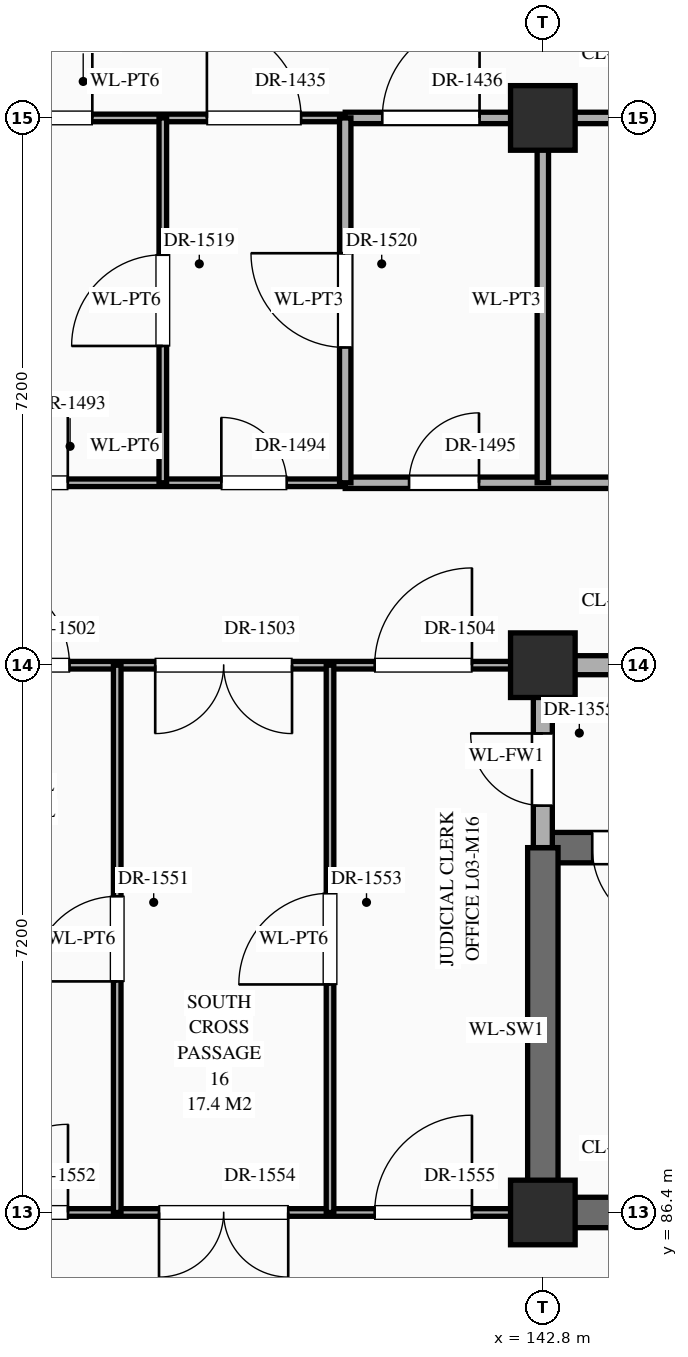
"""IFC4 building model, lengths in metres.
Left out: names, types, materials, properties, quantities, classifications, styles, units other than length and angle.
Written with IfcOpenShell. Run it as: python <this file> out.ifc"""

import sys

from ifc_helpers import new_model, si_unit, direction, frame, frame_2d, origin, origin_2d, place, context, subcontext, project, spatial, rectangle, extrude, element, fill, save


model = new_model("IFC4")
c1 = context("Model", 3, precision=1e-05, world=origin(), true_north=direction((0.0, 1.0)))
c2 = subcontext(c1, "Body", "Model", "MODEL_VIEW")
j1 = project(units=[si_unit("LENGTHUNIT", "METRE"), si_unit("PLANEANGLEUNIT", "RADIAN")], contexts=[c1])
p1 = place(None, origin())
s1 = spatial("IfcSite", under=j1, at=p1, CompositionType="ELEMENT")
p2 = place(p1, origin())
s2 = spatial("IfcBuilding", under=s1, at=p2, CompositionType="ELEMENT")
p3 = place(p2, frame((0.0, 0.0, 10.8)))
s3 = spatial("IfcBuildingStorey", under=s2, at=p3, CompositionType="ELEMENT", Elevation=10.8)
for number, where, z_axis, x_axis in (
    (1, (142.8, 86.4, 0.0), (0.0, 0.0, 1.0), (1.0, 0.0, 0.0)),
    (2, (142.8, 93.6, 0.0), (0.0, 0.0, 1.0), (1.0, 0.0, 0.0)),
    (3, (142.8, 100.8, 0.0), (0.0, 0.0, 1.0), (1.0, 0.0, 0.0)),
):
    element("IfcColumn", number, at=place(p3, frame(where, z_axis=z_axis, x_axis=x_axis)), inside=s3, PredefinedType="COLUMN", context=c2, shape_type="SweptSolid", body=[
        extrude(rectangle(XDim=0.85, YDim=0.85, at=origin_2d()), origin(), (0.0, 0.0, 1.0), 5.4),
    ])
p4 = place(p3, frame((126.0, 86.4, 0.0), z_axis=(0.0, 0.0, 1.0), x_axis=(1.0, 0.0, 0.0)))
e4 = element("IfcWall", 4, at=p4, inside=s3, PredefinedType="STANDARD", context=c2, shape_type="SweptSolid", body=[
    extrude(rectangle(XDim=16.8, YDim=0.1, at=frame_2d((8.4, 0.0))), origin(), (0.0, 0.0, 1.0), 4.27),
])
p5 = place(p4, frame((3.66, 0.0, 0.0)))
e5 = element("IfcOpeningElement", 5, at=p5, cuts=e4, PredefinedType="OPENING", context=c2, shape_type="SweptSolid", body=[
    extrude(rectangle(XDim=1.08, YDim=2.25, at=frame_2d((0.54, 1.125))), frame((0.0, 0.062, 0.0), z_axis=(0.0, -1.0, 0.0), x_axis=(1.0, 0.0, 0.0)), (0.0, 0.0, 1.0), 0.124),
])
p6 = place(p4, frame((9.393, 0.0, 0.0)))
e6 = element("IfcOpeningElement", 6, at=p6, cuts=e4, PredefinedType="OPENING", context=c2, shape_type="SweptSolid", body=[
    extrude(rectangle(XDim=1.16, YDim=2.3, at=frame_2d((0.58, 1.15))), frame((0.0, 0.062, 0.0), z_axis=(0.0, -1.0, 0.0), x_axis=(1.0, 0.0, 0.0)), (0.0, 0.0, 1.0), 0.124),
])
p7 = place(p4, frame((11.75, 0.0, 0.0)))
e7 = element("IfcOpeningElement", 7, at=p7, cuts=e4, PredefinedType="OPENING", context=c2, shape_type="SweptSolid", body=[
    extrude(rectangle(XDim=1.7, YDim=2.45, at=frame_2d((0.85, 1.225))), frame((0.0, 0.062, 0.0), z_axis=(0.0, -1.0, 0.0), x_axis=(1.0, 0.0, 0.0)), (0.0, 0.0, 1.0), 0.124),
])
p8 = place(p4, frame((14.587, 0.0, 0.0)))
e8 = element("IfcOpeningElement", 8, at=p8, cuts=e4, PredefinedType="OPENING", context=c2, shape_type="SweptSolid", body=[
    extrude(rectangle(XDim=1.28, YDim=2.35, at=frame_2d((0.64, 1.175))), frame((0.0, 0.062, 0.0), z_axis=(0.0, -1.0, 0.0), x_axis=(1.0, 0.0, 0.0)), (0.0, 0.0, 1.0), 0.124),
])
p9 = place(p3, frame((142.8, 86.4, 0.0), z_axis=(0.0, 0.0, 1.0), x_axis=(1.0, 0.0, 0.0)))
e9 = element("IfcWall", 9, at=p9, inside=s3, PredefinedType="SHEAR", context=c2, shape_type="SweptSolid", body=[
    extrude(rectangle(XDim=8.4, YDim=0.4, at=frame_2d((4.2, 0.0))), origin(), (0.0, 0.0, 1.0), 5.12),
])
p10 = place(p3, frame((142.8, 91.2, 0.0), z_axis=(0.0, 0.0, 1.0), x_axis=(1.0, 0.0, 0.0)))
e10 = element("IfcWall", 10, at=p10, inside=s3, PredefinedType="SHEAR", context=c2, shape_type="SweptSolid", body=[
    extrude(rectangle(XDim=8.4, YDim=0.4, at=frame_2d((4.2, 0.0))), origin(), (0.0, 0.0, 1.0), 5.12),
])
p11 = place(p10, frame((0.65, 0.0, 0.0)))
e11 = element("IfcOpeningElement", 11, at=p11, cuts=e10, PredefinedType="OPENING", context=c2, shape_type="SweptSolid", body=[
    extrude(rectangle(XDim=1.1, YDim=2.2, at=frame_2d((0.55, 1.1))), frame((0.0, 0.212, 0.0), z_axis=(0.0, -1.0, 0.0), x_axis=(1.0, 0.0, 0.0)), (0.0, 0.0, 1.0), 0.424),
])
p12 = place(p3, frame((126.0, 93.6, 0.0), z_axis=(0.0, 0.0, 1.0), x_axis=(1.0, 0.0, 0.0)))
e12 = element("IfcWall", 12, at=p12, inside=s3, PredefinedType="STANDARD", context=c2, shape_type="SweptSolid", body=[
    extrude(rectangle(XDim=16.8, YDim=0.1, at=frame_2d((8.4, 0.0))), origin(), (0.0, 0.0, 1.0), 4.27),
])
p13 = place(p12, frame((3.62, 0.0, 0.0)))
e13 = element("IfcOpeningElement", 13, at=p13, cuts=e12, PredefinedType="OPENING", context=c2, shape_type="SweptSolid", body=[
    extrude(rectangle(XDim=1.16, YDim=2.3, at=frame_2d((0.58, 1.15))), frame((0.0, 0.062, 0.0), z_axis=(0.0, -1.0, 0.0), x_axis=(1.0, 0.0, 0.0)), (0.0, 0.0, 1.0), 0.124),
])
p14 = place(p12, frame((9.373, 0.0, 0.0)))
e14 = element("IfcOpeningElement", 14, at=p14, cuts=e12, PredefinedType="OPENING", context=c2, shape_type="SweptSolid", body=[
    extrude(rectangle(XDim=1.2, YDim=2.35, at=frame_2d((0.6, 1.175))), frame((0.0, 0.062, 0.0), z_axis=(0.0, -1.0, 0.0), x_axis=(1.0, 0.0, 0.0)), (0.0, 0.0, 1.0), 0.124),
])
p15 = place(p12, frame((11.7, 0.0, 0.0)))
e15 = element("IfcOpeningElement", 15, at=p15, cuts=e12, PredefinedType="OPENING", context=c2, shape_type="SweptSolid", body=[
    extrude(rectangle(XDim=1.8, YDim=2.5, at=frame_2d((0.9, 1.25))), frame((0.0, 0.062, 0.0), z_axis=(0.0, -1.0, 0.0), x_axis=(1.0, 0.0, 0.0)), (0.0, 0.0, 1.0), 0.124),
])
p16 = place(p12, frame((14.587, 0.0, 0.0)))
e16 = element("IfcOpeningElement", 16, at=p16, cuts=e12, PredefinedType="OPENING", context=c2, shape_type="SweptSolid", body=[
    extrude(rectangle(XDim=1.28, YDim=2.35, at=frame_2d((0.64, 1.175))), frame((0.0, 0.062, 0.0), z_axis=(0.0, -1.0, 0.0), x_axis=(1.0, 0.0, 0.0)), (0.0, 0.0, 1.0), 0.124),
])
p17 = place(p3, frame((142.8, 93.6, 0.0), z_axis=(0.0, 0.0, 1.0), x_axis=(1.0, 0.0, 0.0)))
e17 = element("IfcWall", 17, at=p17, inside=s3, PredefinedType="STANDARD", context=c2, shape_type="SweptSolid", body=[
    extrude(rectangle(XDim=8.4, YDim=0.25, at=frame_2d((4.2, 0.0))), origin(), (0.0, 0.0, 1.0), 4.27),
])
p18 = place(p17, frame((3.3, 0.0, 0.0)))
e18 = element("IfcOpeningElement", 18, at=p18, cuts=e17, PredefinedType="OPENING", context=c2, shape_type="SweptSolid", body=[
    extrude(rectangle(XDim=1.8, YDim=2.35, at=frame_2d((0.9, 1.175))), frame((0.0, 0.137, 0.0), z_axis=(0.0, -1.0, 0.0), x_axis=(1.0, 0.0, 0.0)), (0.0, 0.0, 1.0), 0.274),
])
p19 = place(p3, frame((134.4, 96.0, 0.0), z_axis=(0.0, 0.0, 1.0), x_axis=(1.0, 0.0, 0.0)))
e19 = element("IfcWall", 19, at=p19, inside=s3, PredefinedType="STANDARD", context=c2, shape_type="SweptSolid", body=[
    extrude(rectangle(XDim=5.8, YDim=0.1, at=frame_2d((2.9, 0.0))), origin(), (0.0, 0.0, 1.0), 5.12),
])
p20 = place(p19, frame((1.25, 0.0, 0.0)))
e20 = element("IfcOpeningElement", 20, at=p20, cuts=e19, PredefinedType="OPENING", context=c2, shape_type="SweptSolid", body=[
    extrude(rectangle(XDim=0.9, YDim=2.15, at=frame_2d((0.45, 1.075))), frame((0.0, 0.062, 0.0), z_axis=(0.0, -1.0, 0.0), x_axis=(1.0, 0.0, 0.0)), (0.0, 0.0, 1.0), 0.124),
])
p21 = place(p19, frame((4.17, 0.0, 0.0)))
e21 = element("IfcOpeningElement", 21, at=p21, cuts=e19, PredefinedType="OPENING", context=c2, shape_type="SweptSolid", body=[
    extrude(rectangle(XDim=0.86, YDim=2.1, at=frame_2d((0.43, 1.05))), frame((0.0, 0.062, 0.0), z_axis=(0.0, -1.0, 0.0), x_axis=(1.0, 0.0, 0.0)), (0.0, 0.0, 1.0), 0.124),
])
p22 = place(p3, frame((140.2, 96.0, 0.0), z_axis=(0.0, 0.0, 1.0), x_axis=(1.0, 0.0, 0.0)))
e22 = element("IfcWall", 22, at=p22, inside=s3, PredefinedType="STANDARD", context=c2, shape_type="SweptSolid", body=[
    extrude(rectangle(XDim=19.4, YDim=0.15, at=frame_2d((9.7, 0.0))), origin(), (0.0, 0.0, 1.0), 5.12),
])
p23 = place(p22, frame((0.84, 0.0, 0.0)))
e23 = element("IfcOpeningElement", 23, at=p23, cuts=e22, PredefinedType="OPENING", context=c2, shape_type="SweptSolid", body=[
    extrude(rectangle(XDim=0.92, YDim=2.15, at=frame_2d((0.46, 1.075))), frame((0.0, 0.087, 0.0), z_axis=(0.0, -1.0, 0.0), x_axis=(1.0, 0.0, 0.0)), (0.0, 0.0, 1.0), 0.174),
])
p24 = place(p22, frame((6.32, 0.0, 0.0)))
e24 = element("IfcOpeningElement", 24, at=p24, cuts=e22, PredefinedType="OPENING", context=c2, shape_type="SweptSolid", body=[
    extrude(rectangle(XDim=0.96, YDim=2.2, at=frame_2d((0.48, 1.1))), frame((0.0, 0.087, 0.0), z_axis=(0.0, -1.0, 0.0), x_axis=(1.0, 0.0, 0.0)), (0.0, 0.0, 1.0), 0.174),
])
p25 = place(p22, frame((14.7, 0.0, 0.0)))
e25 = element("IfcOpeningElement", 25, at=p25, cuts=e22, PredefinedType="OPENING", context=c2, shape_type="SweptSolid", body=[
    extrude(rectangle(XDim=1.0, YDim=2.25, at=frame_2d((0.5, 1.125))), frame((0.0, 0.087, 0.0), z_axis=(0.0, -1.0, 0.0), x_axis=(1.0, 0.0, 0.0)), (0.0, 0.0, 1.0), 0.174),
])
p26 = place(p3, frame((134.4, 100.8, 0.0), z_axis=(0.0, 0.0, 1.0), x_axis=(1.0, 0.0, 0.0)))
e26 = element("IfcWall", 26, at=p26, inside=s3, PredefinedType="STANDARD", context=c2, shape_type="SweptSolid", body=[
    extrude(rectangle(XDim=5.8, YDim=0.1, at=frame_2d((2.9, 0.0))), origin(), (0.0, 0.0, 1.0), 4.27),
])
p27 = place(p26, frame((1.272, 0.0, 0.0)))
e27 = element("IfcOpeningElement", 27, at=p27, cuts=e26, PredefinedType="OPENING", context=c2, shape_type="SweptSolid", body=[
    extrude(rectangle(XDim=1.2, YDim=2.35, at=frame_2d((0.6, 1.175))), frame((0.0, 0.062, 0.0), z_axis=(0.0, -1.0, 0.0), x_axis=(1.0, 0.0, 0.0)), (0.0, 0.0, 1.0), 0.124),
])
p28 = place(p26, frame((3.98, 0.0, 0.0)))
e28 = element("IfcOpeningElement", 28, at=p28, cuts=e26, PredefinedType="OPENING", context=c2, shape_type="SweptSolid", body=[
    extrude(rectangle(XDim=1.24, YDim=2.3, at=frame_2d((0.62, 1.15))), frame((0.0, 0.062, 0.0), z_axis=(0.0, -1.0, 0.0), x_axis=(1.0, 0.0, 0.0)), (0.0, 0.0, 1.0), 0.124),
])
p29 = place(p3, frame((140.2, 100.8, 0.0), z_axis=(0.0, 0.0, 1.0), x_axis=(1.0, 0.0, 0.0)))
e29 = element("IfcWall", 29, at=p29, inside=s3, PredefinedType="STANDARD", context=c2, shape_type="SweptSolid", body=[
    extrude(rectangle(XDim=19.4, YDim=0.15, at=frame_2d((9.7, 0.0))), origin(), (0.0, 0.0, 1.0), 4.27),
])
p30 = place(p29, frame((0.488, 0.0, 0.0)))
e30 = element("IfcOpeningElement", 30, at=p30, cuts=e29, PredefinedType="OPENING", context=c2, shape_type="SweptSolid", body=[
    extrude(rectangle(XDim=1.28, YDim=2.35, at=frame_2d((0.64, 1.175))), frame((0.0, 0.087, 0.0), z_axis=(0.0, -1.0, 0.0), x_axis=(1.0, 0.0, 0.0)), (0.0, 0.0, 1.0), 0.174),
])
p31 = place(p29, frame((6.33, 0.0, 0.0)))
e31 = element("IfcOpeningElement", 31, at=p31, cuts=e29, PredefinedType="OPENING", context=c2, shape_type="SweptSolid", body=[
    extrude(rectangle(XDim=0.94, YDim=2.3, at=frame_2d((0.47, 1.15))), frame((0.0, 0.087, 0.0), z_axis=(0.0, -1.0, 0.0), x_axis=(1.0, 0.0, 0.0)), (0.0, 0.0, 1.0), 0.174),
])
p32 = place(p29, frame((14.71, 0.0, 0.0)))
e32 = element("IfcOpeningElement", 32, at=p32, cuts=e29, PredefinedType="OPENING", context=c2, shape_type="SweptSolid", body=[
    extrude(rectangle(XDim=0.98, YDim=2.35, at=frame_2d((0.49, 1.175))), frame((0.0, 0.087, 0.0), z_axis=(0.0, -1.0, 0.0), x_axis=(1.0, 0.0, 0.0)), (0.0, 0.0, 1.0), 0.174),
])
p33 = place(p3, frame((137.2, 86.4, 0.0), z_axis=(0.0, 0.0, 1.0), x_axis=(0.0, 1.0, 0.0)))
e33 = element("IfcWall", 33, at=p33, inside=s3, PredefinedType="STANDARD", context=c2, shape_type="SweptSolid", body=[
    extrude(rectangle(XDim=7.2, YDim=0.1, at=frame_2d((3.6, 0.0))), origin(), (0.0, 0.0, 1.0), 5.12),
])
p34 = place(p33, frame((3.04, 0.0, 0.0)))
e34 = element("IfcOpeningElement", 34, at=p34, cuts=e33, PredefinedType="OPENING", context=c2, shape_type="SweptSolid", body=[
    extrude(rectangle(XDim=1.12, YDim=2.25, at=frame_2d((0.56, 1.125))), frame((0.0, 0.062, 0.0), z_axis=(0.0, -1.0, 0.0), x_axis=(1.0, 0.0, 0.0)), (0.0, 0.0, 1.0), 0.124),
])
p35 = place(p3, frame((137.8, 96.0, 0.0), z_axis=(0.0, 0.0, 1.0), x_axis=(0.0, 1.0, 0.0)))
e35 = element("IfcWall", 35, at=p35, inside=s3, PredefinedType="STANDARD", context=c2, shape_type="SweptSolid", body=[
    extrude(rectangle(XDim=4.8, YDim=0.1, at=frame_2d((2.4, 0.0))), origin(), (0.0, 0.0, 1.0), 5.12),
])
p36 = place(p35, frame((1.8, 0.0, 0.0)))
e36 = element("IfcOpeningElement", 36, at=p36, cuts=e35, PredefinedType="OPENING", context=c2, shape_type="SweptSolid", body=[
    extrude(rectangle(XDim=1.2, YDim=2.35, at=frame_2d((0.6, 1.175))), frame((0.0, 0.062, 0.0), z_axis=(0.0, -1.0, 0.0), x_axis=(1.0, 0.0, 0.0)), (0.0, 0.0, 1.0), 0.124),
])
p37 = place(p3, frame((140.0, 86.4, 0.0), z_axis=(0.0, 0.0, 1.0), x_axis=(0.0, 1.0, 0.0)))
e37 = element("IfcWall", 37, at=p37, inside=s3, PredefinedType="STANDARD", context=c2, shape_type="SweptSolid", body=[
    extrude(rectangle(XDim=7.2, YDim=0.1, at=frame_2d((3.6, 0.0))), origin(), (0.0, 0.0, 1.0), 5.12),
])
p38 = place(p37, frame((3.0, 0.0, 0.0)))
e38 = element("IfcOpeningElement", 38, at=p38, cuts=e37, PredefinedType="OPENING", context=c2, shape_type="SweptSolid", body=[
    extrude(rectangle(XDim=1.2, YDim=2.35, at=frame_2d((0.6, 1.175))), frame((0.0, 0.062, 0.0), z_axis=(0.0, -1.0, 0.0), x_axis=(1.0, 0.0, 0.0)), (0.0, 0.0, 1.0), 0.124),
])
p39 = place(p3, frame((140.2, 96.0, 0.0), z_axis=(0.0, 0.0, 1.0), x_axis=(0.0, 1.0, 0.0)))
e39 = element("IfcWall", 39, at=p39, inside=s3, PredefinedType="STANDARD", context=c2, shape_type="SweptSolid", body=[
    extrude(rectangle(XDim=4.8, YDim=0.15, at=frame_2d((2.4, 0.0))), origin(), (0.0, 0.0, 1.0), 5.12),
])
p40 = place(p39, frame((1.78, 0.0, 0.0)))
e40 = element("IfcOpeningElement", 40, at=p40, cuts=e39, PredefinedType="OPENING", context=c2, shape_type="SweptSolid", body=[
    extrude(rectangle(XDim=1.24, YDim=2.3, at=frame_2d((0.62, 1.15))), frame((0.0, 0.087, 0.0), z_axis=(0.0, -1.0, 0.0), x_axis=(1.0, 0.0, 0.0)), (0.0, 0.0, 1.0), 0.174),
])
p41 = place(p3, frame((142.8, 86.4, 0.0), z_axis=(0.0, 0.0, 1.0), x_axis=(0.0, 1.0, 0.0)))
e41 = element("IfcWall", 41, at=p41, inside=s3, PredefinedType="SHEAR", context=c2, shape_type="SweptSolid", body=[
    extrude(rectangle(XDim=4.8, YDim=0.4, at=frame_2d((2.4, 0.0))), origin(), (0.0, 0.0, 1.0), 5.12),
])
p42 = place(p3, frame((142.8, 91.2, 0.0), z_axis=(0.0, 0.0, 1.0), x_axis=(0.0, 1.0, 0.0)))
e42 = element("IfcWall", 42, at=p42, inside=s3, PredefinedType="STANDARD", context=c2, shape_type="SweptSolid", body=[
    extrude(rectangle(XDim=2.4, YDim=0.25, at=frame_2d((1.2, 0.0))), origin(), (0.0, 0.0, 1.0), 4.37),
])
p43 = place(p42, frame((0.552, 0.0, 0.0)))
e43 = element("IfcOpeningElement", 43, at=p43, cuts=e42, PredefinedType="OPENING", context=c2, shape_type="SweptSolid", body=[
    extrude(rectangle(XDim=0.95, YDim=2.15, at=frame_2d((0.475, 1.075))), frame((0.0, 0.137, 0.0), z_axis=(0.0, -1.0, 0.0), x_axis=(1.0, 0.0, 0.0)), (0.0, 0.0, 1.0), 0.274),
])
p44 = place(p3, frame((142.8, 96.0, 0.0), z_axis=(0.0, 0.0, 1.0), x_axis=(0.0, 1.0, 0.0)))
e44 = element("IfcWall", 44, at=p44, inside=s3, PredefinedType="STANDARD", context=c2, shape_type="SweptSolid", body=[
    extrude(rectangle(XDim=4.8, YDim=0.15, at=frame_2d((2.4, 0.0))), origin(), (0.0, 0.0, 1.0), 4.37),
])
p45 = place(p11, frame((1.1, 0.0, 0.0), z_axis=(0.0, 0.0, 1.0), x_axis=(-1.0, 0.0, 0.0)))
e45 = element("IfcDoor", 45, at=p45, inside=s3, OperationType="SINGLE_SWING_LEFT", PredefinedType="DOOR", context=c2, shape_type="SweptSolid", body=[
    extrude(rectangle(XDim=1.1, YDim=2.2, at=frame_2d((0.55, 1.1))), frame((0.0, 0.025, 0.0), z_axis=(0.0, -1.0, 0.0), x_axis=(1.0, 0.0, 0.0)), (0.0, 0.0, 1.0), 0.05),
])
fill(e11, e45)
p46 = place(p43, origin())
e46 = element("IfcDoor", 46, at=p46, inside=s3, OperationType="SINGLE_SWING_RIGHT", PredefinedType="DOOR", context=c2, shape_type="SweptSolid", body=[
    extrude(rectangle(XDim=0.95, YDim=2.15, at=frame_2d((0.475, 1.075))), frame((0.0, 0.025, 0.0), z_axis=(0.0, -1.0, 0.0), x_axis=(1.0, 0.0, 0.0)), (0.0, 0.0, 1.0), 0.05),
])
fill(e43, e46)
p47 = place(p27, origin())
e47 = element("IfcDoor", 47, at=p47, inside=s3, OperationType="SINGLE_SWING_RIGHT", PredefinedType="DOOR", context=c2, shape_type="SweptSolid", body=[
    extrude(rectangle(XDim=1.2, YDim=2.35, at=frame_2d((0.6, 1.175))), frame((0.0, 0.025, 0.0), z_axis=(0.0, -1.0, 0.0), x_axis=(1.0, 0.0, 0.0)), (0.0, 0.0, 1.0), 0.05),
])
fill(e27, e47)
p48 = place(p28, origin())
e48 = element("IfcDoor", 48, at=p48, inside=s3, OperationType="SINGLE_SWING_LEFT", PredefinedType="DOOR", context=c2, shape_type="SweptSolid", body=[
    extrude(rectangle(XDim=1.24, YDim=2.3, at=frame_2d((0.62, 1.15))), frame((0.0, 0.025, 0.0), z_axis=(0.0, -1.0, 0.0), x_axis=(1.0, 0.0, 0.0)), (0.0, 0.0, 1.0), 0.05),
])
fill(e28, e48)
p49 = place(p30, origin())
e49 = element("IfcDoor", 49, at=p49, inside=s3, OperationType="SINGLE_SWING_RIGHT", PredefinedType="DOOR", context=c2, shape_type="SweptSolid", body=[
    extrude(rectangle(XDim=1.28, YDim=2.35, at=frame_2d((0.64, 1.175))), frame((0.0, 0.025, 0.0), z_axis=(0.0, -1.0, 0.0), x_axis=(1.0, 0.0, 0.0)), (0.0, 0.0, 1.0), 0.05),
])
fill(e30, e49)
p50 = place(p20, origin())
e50 = element("IfcDoor", 50, at=p50, inside=s3, OperationType="SINGLE_SWING_RIGHT", PredefinedType="DOOR", context=c2, shape_type="SweptSolid", body=[
    extrude(rectangle(XDim=0.9, YDim=2.15, at=frame_2d((0.45, 1.075))), frame((0.0, 0.025, 0.0), z_axis=(0.0, -1.0, 0.0), x_axis=(1.0, 0.0, 0.0)), (0.0, 0.0, 1.0), 0.05),
])
fill(e20, e50)
p51 = place(p21, origin())
e51 = element("IfcDoor", 51, at=p51, inside=s3, OperationType="SINGLE_SWING_LEFT", PredefinedType="DOOR", context=c2, shape_type="SweptSolid", body=[
    extrude(rectangle(XDim=0.86, YDim=2.1, at=frame_2d((0.43, 1.05))), frame((0.0, 0.025, 0.0), z_axis=(0.0, -1.0, 0.0), x_axis=(1.0, 0.0, 0.0)), (0.0, 0.0, 1.0), 0.05),
])
fill(e21, e51)
p52 = place(p23, origin())
e52 = element("IfcDoor", 52, at=p52, inside=s3, OperationType="SINGLE_SWING_RIGHT", PredefinedType="DOOR", context=c2, shape_type="SweptSolid", body=[
    extrude(rectangle(XDim=0.92, YDim=2.15, at=frame_2d((0.46, 1.075))), frame((0.0, 0.025, 0.0), z_axis=(0.0, -1.0, 0.0), x_axis=(1.0, 0.0, 0.0)), (0.0, 0.0, 1.0), 0.05),
])
fill(e23, e52)
p53 = place(p14, origin())
e53 = element("IfcDoor", 53, at=p53, inside=s3, OperationType="SINGLE_SWING_LEFT", PredefinedType="DOOR", context=c2, shape_type="SweptSolid", body=[
    extrude(rectangle(XDim=1.2, YDim=2.35, at=frame_2d((0.6, 1.175))), frame((0.0, 0.025, 0.0), z_axis=(0.0, -1.0, 0.0), x_axis=(1.0, 0.0, 0.0)), (0.0, 0.0, 1.0), 0.05),
])
fill(e14, e53)
p54 = place(p15, frame((1.8, 0.0, 0.0), z_axis=(0.0, 0.0, 1.0), x_axis=(-1.0, 0.0, 0.0)))
e54 = element("IfcDoor", 54, at=p54, inside=s3, OperationType="DOUBLE_DOOR_SINGLE_SWING", PredefinedType="DOOR", context=c2, shape_type="SweptSolid", body=[
    extrude(rectangle(XDim=1.8, YDim=2.5, at=frame_2d((0.9, 1.25))), frame((0.0, 0.025, 0.0), z_axis=(0.0, -1.0, 0.0), x_axis=(1.0, 0.0, 0.0)), (0.0, 0.0, 1.0), 0.05),
])
fill(e15, e54)
p55 = place(p16, origin())
e55 = element("IfcDoor", 55, at=p55, inside=s3, OperationType="SINGLE_SWING_RIGHT", PredefinedType="DOOR", context=c2, shape_type="SweptSolid", body=[
    extrude(rectangle(XDim=1.28, YDim=2.35, at=frame_2d((0.64, 1.175))), frame((0.0, 0.025, 0.0), z_axis=(0.0, -1.0, 0.0), x_axis=(1.0, 0.0, 0.0)), (0.0, 0.0, 1.0), 0.05),
])
fill(e16, e55)
p56 = place(p36, origin())
e56 = element("IfcDoor", 56, at=p56, inside=s3, OperationType="SINGLE_SWING_LEFT", PredefinedType="DOOR", context=c2, shape_type="SweptSolid", body=[
    extrude(rectangle(XDim=1.2, YDim=2.35, at=frame_2d((0.6, 1.175))), frame((0.0, 0.025, 0.0), z_axis=(0.0, -1.0, 0.0), x_axis=(1.0, 0.0, 0.0)), (0.0, 0.0, 1.0), 0.05),
])
fill(e36, e56)
p57 = place(p40, origin())
e57 = element("IfcDoor", 57, at=p57, inside=s3, OperationType="SINGLE_SWING_RIGHT", PredefinedType="DOOR", context=c2, shape_type="SweptSolid", body=[
    extrude(rectangle(XDim=1.24, YDim=2.3, at=frame_2d((0.62, 1.15))), frame((0.0, 0.025, 0.0), z_axis=(0.0, -1.0, 0.0), x_axis=(1.0, 0.0, 0.0)), (0.0, 0.0, 1.0), 0.05),
])
fill(e40, e57)
p58 = place(p34, origin())
e58 = element("IfcDoor", 58, at=p58, inside=s3, OperationType="SINGLE_SWING_LEFT", PredefinedType="DOOR", context=c2, shape_type="SweptSolid", body=[
    extrude(rectangle(XDim=1.12, YDim=2.25, at=frame_2d((0.56, 1.125))), frame((0.0, 0.025, 0.0), z_axis=(0.0, -1.0, 0.0), x_axis=(1.0, 0.0, 0.0)), (0.0, 0.0, 1.0), 0.05),
])
fill(e34, e58)
p59 = place(p6, origin())
e59 = element("IfcDoor", 59, at=p59, inside=s3, OperationType="SINGLE_SWING_RIGHT", PredefinedType="DOOR", context=c2, shape_type="SweptSolid", body=[
    extrude(rectangle(XDim=1.16, YDim=2.3, at=frame_2d((0.58, 1.15))), frame((0.0, 0.025, 0.0), z_axis=(0.0, -1.0, 0.0), x_axis=(1.0, 0.0, 0.0)), (0.0, 0.0, 1.0), 0.05),
])
fill(e6, e59)
p60 = place(p38, origin())
e60 = element("IfcDoor", 60, at=p60, inside=s3, OperationType="SINGLE_SWING_LEFT", PredefinedType="DOOR", context=c2, shape_type="SweptSolid", body=[
    extrude(rectangle(XDim=1.2, YDim=2.35, at=frame_2d((0.6, 1.175))), frame((0.0, 0.025, 0.0), z_axis=(0.0, -1.0, 0.0), x_axis=(1.0, 0.0, 0.0)), (0.0, 0.0, 1.0), 0.05),
])
fill(e38, e60)
p61 = place(p7, frame((1.7, 0.0, 0.0), z_axis=(0.0, 0.0, 1.0), x_axis=(-1.0, 0.0, 0.0)))
e61 = element("IfcDoor", 61, at=p61, inside=s3, OperationType="DOUBLE_DOOR_SINGLE_SWING", PredefinedType="DOOR", context=c2, shape_type="SweptSolid", body=[
    extrude(rectangle(XDim=1.7, YDim=2.45, at=frame_2d((0.85, 1.225))), frame((0.0, 0.025, 0.0), z_axis=(0.0, -1.0, 0.0), x_axis=(1.0, 0.0, 0.0)), (0.0, 0.0, 1.0), 0.05),
])
fill(e7, e61)
p62 = place(p8, origin())
e62 = element("IfcDoor", 62, at=p62, inside=s3, OperationType="SINGLE_SWING_RIGHT", PredefinedType="DOOR", context=c2, shape_type="SweptSolid", body=[
    extrude(rectangle(XDim=1.28, YDim=2.35, at=frame_2d((0.64, 1.175))), frame((0.0, 0.025, 0.0), z_axis=(0.0, -1.0, 0.0), x_axis=(1.0, 0.0, 0.0)), (0.0, 0.0, 1.0), 0.05),
])
fill(e8, e62)
save(model, sys.argv[1])
